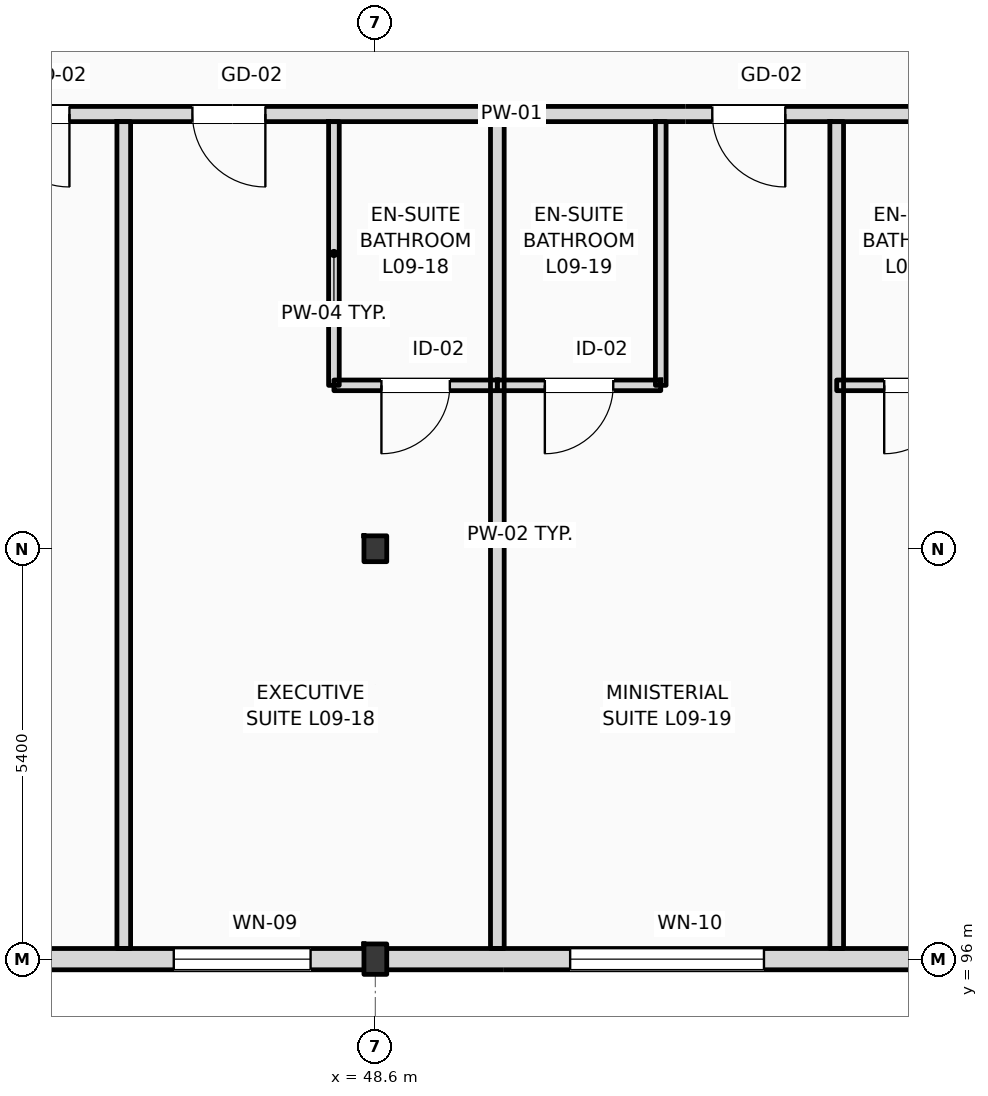
"""IFC4 building model, lengths in metres.
Left out: names, types, materials, properties, quantities, classifications, styles, units other than length and angle.
Written with IfcOpenShell. Run it as: python <this file> out.ifc"""

import sys

from ifc_helpers import new_model, si_unit, direction, frame, frame_2d, origin, origin_2d, place, context, subcontext, project, spatial, rectangle, i_section, extrude, element, fill, save


model = new_model("IFC4")
c1 = context("Model", 3, precision=1e-05, world=origin(), true_north=direction((0.0, 1.0)))
c2 = subcontext(c1, "Body", "Model", "MODEL_VIEW")
j1 = project(units=[si_unit("LENGTHUNIT", "METRE"), si_unit("PLANEANGLEUNIT", "RADIAN")], contexts=[c1])
p1 = place(None, origin())
s1 = spatial("IfcSite", under=j1, at=p1, CompositionType="ELEMENT")
p2 = place(p1, origin())
s2 = spatial("IfcBuilding", under=s1, at=p2, CompositionType="ELEMENT")
p3 = place(p2, frame((0.0, 0.0, 39.0)))
s3 = spatial("IfcBuildingStorey", under=s2, at=p3, CompositionType="ELEMENT", Elevation=39.0)
p4 = place(p3, frame((48.6, 96.0, 0.0), z_axis=(0.0, 0.0, 1.0), x_axis=(1.0, 0.0, 0.0)))
e1 = element("IfcColumn", 1, at=p4, inside=s3, PredefinedType="COLUMN", context=c2, shape_type="SweptSolid", body=[
    extrude(i_section(OverallWidth=0.3, OverallDepth=0.4, WebThickness=0.013, FlangeThickness=0.024, FilletRadius=0.027, at=origin_2d()), origin(), (0.0, 0.0, 1.0), 3.6),
])
p5 = place(p3, frame((48.6, 101.4, 0.0), z_axis=(0.0, 0.0, 1.0), x_axis=(1.0, 0.0, 0.0)))
e2 = element("IfcColumn", 2, at=p5, inside=s3, PredefinedType="COLUMN", context=c2, shape_type="SweptSolid", body=[
    extrude(i_section(OverallWidth=0.3, OverallDepth=0.34, WebThickness=0.012, FlangeThickness=0.021, FilletRadius=0.027, at=origin_2d()), origin(), (0.0, 0.0, 1.0), 3.6),
])
p6 = place(p3, frame((25.2, 96.0, 0.0), z_axis=(0.0, 0.0, 1.0), x_axis=(1.0, 0.0, 0.0)))
e3 = element("IfcWall", 3, at=p6, inside=s3, PredefinedType="STANDARD", context=c2, shape_type="SweptSolid", body=[
    extrude(rectangle(XDim=70.2, YDim=0.28, at=frame_2d((35.1, 0.0))), origin(), (0.0, 0.0, 1.0), 2.92),
])
p7 = place(p6, frame((16.695, 0.0, 0.9)))
e4 = element("IfcOpeningElement", 4, at=p7, cuts=e3, PredefinedType="OPENING", context=c2, shape_type="SweptSolid", body=[
    extrude(rectangle(XDim=2.25, YDim=1.84, at=frame_2d((1.125, 0.92))), frame((0.0, 0.15, 0.0), z_axis=(0.0, -1.0, 0.0), x_axis=(1.0, 0.0, 0.0)), (0.0, 0.0, 1.0), 0.3),
])
p8 = place(p6, frame((20.748, 0.0, 0.9)))
e5 = element("IfcOpeningElement", 5, at=p8, cuts=e3, PredefinedType="OPENING", context=c2, shape_type="SweptSolid", body=[
    extrude(rectangle(XDim=1.8, YDim=1.84, at=frame_2d((0.9, 0.92))), frame((0.0, 0.15, 0.0), z_axis=(0.0, -1.0, 0.0), x_axis=(1.0, 0.0, 0.0)), (0.0, 0.0, 1.0), 0.3),
])
p9 = place(p6, frame((25.963, 0.0, 0.9)))
e6 = element("IfcOpeningElement", 6, at=p9, cuts=e3, PredefinedType="OPENING", context=c2, shape_type="SweptSolid", body=[
    extrude(rectangle(XDim=2.55, YDim=1.84, at=frame_2d((1.275, 0.92))), frame((0.0, 0.15, 0.0), z_axis=(0.0, -1.0, 0.0), x_axis=(1.0, 0.0, 0.0)), (0.0, 0.0, 1.0), 0.3),
])
p10 = place(p6, frame((32.177, 0.0, 0.9)))
e7 = element("IfcOpeningElement", 7, at=p10, cuts=e3, PredefinedType="OPENING", context=c2, shape_type="SweptSolid", body=[
    extrude(rectangle(XDim=1.35, YDim=1.84, at=frame_2d((0.675, 0.92))), frame((0.0, 0.15, 0.0), z_axis=(0.0, -1.0, 0.0), x_axis=(1.0, 0.0, 0.0)), (0.0, 0.0, 1.0), 0.3),
])
p11 = place(p6, frame((35.267, 0.0, 0.9)))
e8 = element("IfcOpeningElement", 8, at=p11, cuts=e3, PredefinedType="OPENING", context=c2, shape_type="SweptSolid", body=[
    extrude(rectangle(XDim=2.85, YDim=1.84, at=frame_2d((1.425, 0.92))), frame((0.0, 0.15, 0.0), z_axis=(0.0, -1.0, 0.0), x_axis=(1.0, 0.0, 0.0)), (0.0, 0.0, 1.0), 0.3),
])
p12 = place(p6, frame((55.56, 0.0, 0.9)))
e9 = element("IfcOpeningElement", 9, at=p12, cuts=e3, PredefinedType="OPENING", context=c2, shape_type="SweptSolid", body=[
    extrude(rectangle(XDim=1.8, YDim=1.84, at=frame_2d((0.9, 0.92))), frame((0.0, 0.15, 0.0), z_axis=(0.0, -1.0, 0.0), x_axis=(1.0, 0.0, 0.0)), (0.0, 0.0, 1.0), 0.3),
])
p13 = place(p6, frame((59.093, 0.0, 0.9)))
e10 = element("IfcOpeningElement", 10, at=p13, cuts=e3, PredefinedType="OPENING", context=c2, shape_type="SweptSolid", body=[
    extrude(rectangle(XDim=2.412, YDim=1.84, at=frame_2d((1.206, 0.92))), frame((0.0, 0.15, 0.0), z_axis=(0.0, -1.0, 0.0), x_axis=(1.0, 0.0, 0.0)), (0.0, 0.0, 1.0), 0.3),
])
p14 = place(p6, frame((63.325, 0.0, 0.9)))
e11 = element("IfcOpeningElement", 11, at=p14, cuts=e3, PredefinedType="OPENING", context=c2, shape_type="SweptSolid", body=[
    extrude(rectangle(XDim=1.8, YDim=1.84, at=frame_2d((0.9, 0.92))), frame((0.0, 0.15, 0.0), z_axis=(0.0, -1.0, 0.0), x_axis=(1.0, 0.0, 0.0)), (0.0, 0.0, 1.0), 0.3),
])
p15 = place(p6, frame((66.718, 0.0, 0.9)))
e12 = element("IfcOpeningElement", 12, at=p15, cuts=e3, PredefinedType="OPENING", context=c2, shape_type="SweptSolid", body=[
    extrude(rectangle(XDim=2.472, YDim=1.84, at=frame_2d((1.236, 0.92))), frame((0.0, 0.15, 0.0), z_axis=(0.0, -1.0, 0.0), x_axis=(1.0, 0.0, 0.0)), (0.0, 0.0, 1.0), 0.3),
])
p16 = place(p3, frame((40.76, 107.12, 0.0), z_axis=(0.0, 0.0, 1.0), x_axis=(1.0, 0.0, 0.0)))
e13 = element("IfcWall", 13, at=p16, inside=s3, PredefinedType="PARTITIONING", context=c2, shape_type="SweptSolid", body=[
    extrude(rectangle(XDim=23.44, YDim=0.2, at=frame_2d((11.72, 0.0))), origin(), (0.0, 0.0, 1.0), 3.38),
])
p17 = place(p16, frame((2.855, 0.0, 0.0)))
e14 = element("IfcOpeningElement", 14, at=p17, cuts=e13, PredefinedType="OPENING", context=c2, shape_type="SweptSolid", body=[
    extrude(rectangle(XDim=0.96, YDim=2.2, at=frame_2d((0.48, 1.1))), frame((0.0, 0.11, 0.0), z_axis=(0.0, -1.0, 0.0), x_axis=(1.0, 0.0, 0.0)), (0.0, 0.0, 1.0), 0.22),
])
p18 = place(p16, frame((5.433, 0.0, 0.0)))
e15 = element("IfcOpeningElement", 15, at=p18, cuts=e13, PredefinedType="OPENING", context=c2, shape_type="SweptSolid", body=[
    extrude(rectangle(XDim=0.96, YDim=2.2, at=frame_2d((0.48, 1.1))), frame((0.0, 0.11, 0.0), z_axis=(0.0, -1.0, 0.0), x_axis=(1.0, 0.0, 0.0)), (0.0, 0.0, 1.0), 0.22),
])
p19 = place(p16, frame((12.273, 0.0, 0.0)))
e16 = element("IfcOpeningElement", 16, at=p19, cuts=e13, PredefinedType="OPENING", context=c2, shape_type="SweptSolid", body=[
    extrude(rectangle(XDim=0.96, YDim=2.2, at=frame_2d((0.48, 1.1))), frame((0.0, 0.11, 0.0), z_axis=(0.0, -1.0, 0.0), x_axis=(1.0, 0.0, 0.0)), (0.0, 0.0, 1.0), 0.22),
])
p20 = place(p16, frame((16.963, 0.0, 0.0)))
e17 = element("IfcOpeningElement", 17, at=p20, cuts=e13, PredefinedType="OPENING", context=c2, shape_type="SweptSolid", body=[
    extrude(rectangle(XDim=0.96, YDim=2.2, at=frame_2d((0.48, 1.1))), frame((0.0, 0.11, 0.0), z_axis=(0.0, -1.0, 0.0), x_axis=(1.0, 0.0, 0.0)), (0.0, 0.0, 1.0), 0.22),
])
p21 = place(p16, frame((19.578, 0.0, 0.0)))
e18 = element("IfcOpeningElement", 18, at=p21, cuts=e13, PredefinedType="OPENING", context=c2, shape_type="SweptSolid", body=[
    extrude(rectangle(XDim=0.96, YDim=2.2, at=frame_2d((0.48, 1.1))), frame((0.0, 0.11, 0.0), z_axis=(0.0, -1.0, 0.0), x_axis=(1.0, 0.0, 0.0)), (0.0, 0.0, 1.0), 0.22),
])
for number, where, z_axis, x_axis in (
    (19, (45.29, 96.14, 0.0), (0.0, 0.0, 1.0), (0.0, 1.0, 0.0)),
    (20, (50.205, 96.14, 0.0), (0.0, 0.0, 1.0), (0.0, 1.0, 0.0)),
):
    element("IfcWall", number, at=place(p3, frame(where, z_axis=z_axis, x_axis=x_axis)), inside=s3, PredefinedType="PARTITIONING", context=c2, shape_type="SweptSolid", body=[
        extrude(rectangle(XDim=10.88, YDim=0.18, at=frame_2d((5.44, 0.0))), origin(), (0.0, 0.0, 1.0), 3.38),
    ])
p22 = place(p3, frame((48.055, 103.55, 0.0), z_axis=(0.0, 0.0, 1.0), x_axis=(0.0, 1.0, 0.0)))
e21 = element("IfcWall", 21, at=p22, inside=s3, PredefinedType="PARTITIONING", context=c2, shape_type="SweptSolid", body=[
    extrude(rectangle(XDim=3.47, YDim=0.14, at=frame_2d((1.735, 0.0))), origin(), (0.0, 0.0, 1.0), 3.38),
])
p23 = place(p3, frame((48.055, 103.55, 0.0), z_axis=(0.0, 0.0, 1.0), x_axis=(1.0, 0.0, 0.0)))
e22 = element("IfcWall", 22, at=p23, inside=s3, PredefinedType="PARTITIONING", context=c2, shape_type="SweptSolid", body=[
    extrude(rectangle(XDim=2.15, YDim=0.14, at=frame_2d((1.075, 0.0))), origin(), (0.0, 0.0, 1.0), 3.38),
])
p24 = place(p23, frame((0.625, 0.0, 0.0)))
e23 = element("IfcOpeningElement", 23, at=p24, cuts=e22, PredefinedType="OPENING", context=c2, shape_type="SweptSolid", body=[
    extrude(rectangle(XDim=0.9, YDim=2.1, at=frame_2d((0.45, 1.05))), frame((0.0, 0.08, 0.0), z_axis=(0.0, -1.0, 0.0), x_axis=(1.0, 0.0, 0.0)), (0.0, 0.0, 1.0), 0.16),
])
p25 = place(p3, frame((54.67, 96.14, 0.0), z_axis=(0.0, 0.0, 1.0), x_axis=(0.0, 1.0, 0.0)))
e24 = element("IfcWall", 24, at=p25, inside=s3, PredefinedType="PARTITIONING", context=c2, shape_type="SweptSolid", body=[
    extrude(rectangle(XDim=10.88, YDim=0.18, at=frame_2d((5.44, 0.0))), origin(), (0.0, 0.0, 1.0), 3.38),
])
p26 = place(p3, frame((52.355, 103.55, 0.0), z_axis=(0.0, 0.0, 1.0), x_axis=(0.0, 1.0, 0.0)))
e25 = element("IfcWall", 25, at=p26, inside=s3, PredefinedType="PARTITIONING", context=c2, shape_type="SweptSolid", body=[
    extrude(rectangle(XDim=3.47, YDim=0.14, at=frame_2d((1.735, 0.0))), origin(), (0.0, 0.0, 1.0), 3.38),
])
p27 = place(p3, frame((50.205, 103.55, 0.0), z_axis=(0.0, 0.0, 1.0), x_axis=(1.0, 0.0, 0.0)))
e26 = element("IfcWall", 26, at=p27, inside=s3, PredefinedType="PARTITIONING", context=c2, shape_type="SweptSolid", body=[
    extrude(rectangle(XDim=2.15, YDim=0.14, at=frame_2d((1.075, 0.0))), origin(), (0.0, 0.0, 1.0), 3.38),
])
p28 = place(p27, frame((0.625, 0.0, 0.0)))
e27 = element("IfcOpeningElement", 27, at=p28, cuts=e26, PredefinedType="OPENING", context=c2, shape_type="SweptSolid", body=[
    extrude(rectangle(XDim=0.9, YDim=2.1, at=frame_2d((0.45, 1.05))), frame((0.0, 0.08, 0.0), z_axis=(0.0, -1.0, 0.0), x_axis=(1.0, 0.0, 0.0)), (0.0, 0.0, 1.0), 0.16),
])
p29 = place(p3, frame((54.67, 103.55, 0.0), z_axis=(0.0, 0.0, 1.0), x_axis=(1.0, 0.0, 0.0)))
e28 = element("IfcWall", 28, at=p29, inside=s3, PredefinedType="PARTITIONING", context=c2, shape_type="SweptSolid", body=[
    extrude(rectangle(XDim=2.15, YDim=0.14, at=frame_2d((1.075, 0.0))), origin(), (0.0, 0.0, 1.0), 3.38),
])
p30 = place(p29, frame((0.625, 0.0, 0.0)))
e29 = element("IfcOpeningElement", 29, at=p30, cuts=e28, PredefinedType="OPENING", context=c2, shape_type="SweptSolid", body=[
    extrude(rectangle(XDim=0.9, YDim=2.1, at=frame_2d((0.45, 1.05))), frame((0.0, 0.08, 0.0), z_axis=(0.0, -1.0, 0.0), x_axis=(1.0, 0.0, 0.0)), (0.0, 0.0, 1.0), 0.16),
])
p31 = place(p8, origin())
e30 = element("IfcWindow", 30, at=p31, inside=s3, PartitioningType="DOUBLE_PANEL_VERTICAL", PredefinedType="WINDOW", context=c2, shape_type="SweptSolid", body=[
    extrude(rectangle(XDim=1.8, YDim=1.84, at=frame_2d((0.9, 0.92))), frame((0.0, 0.03, 0.0), z_axis=(0.0, -1.0, 0.0), x_axis=(1.0, 0.0, 0.0)), (0.0, 0.0, 1.0), 0.06),
])
fill(e5, e30)
p32 = place(p9, origin())
e31 = element("IfcWindow", 31, at=p32, inside=s3, PartitioningType="DOUBLE_PANEL_VERTICAL", PredefinedType="WINDOW", context=c2, shape_type="SweptSolid", body=[
    extrude(rectangle(XDim=2.55, YDim=1.84, at=frame_2d((1.275, 0.92))), frame((0.0, 0.03, 0.0), z_axis=(0.0, -1.0, 0.0), x_axis=(1.0, 0.0, 0.0)), (0.0, 0.0, 1.0), 0.06),
])
fill(e6, e31)
p33 = place(p17, frame((0.96, 0.0, 0.0), z_axis=(0.0, 0.0, 1.0), x_axis=(-1.0, 0.0, 0.0)))
e32 = element("IfcDoor", 32, at=p33, inside=s3, OperationType="SINGLE_SWING_RIGHT", PredefinedType="DOOR", context=c2, shape_type="SweptSolid", body=[
    extrude(rectangle(XDim=0.96, YDim=2.2, at=frame_2d((0.48, 1.1))), frame((0.0, 0.025, 0.0), z_axis=(0.0, -1.0, 0.0), x_axis=(1.0, 0.0, 0.0)), (0.0, 0.0, 1.0), 0.05),
])
fill(e14, e32)
p34 = place(p18, frame((0.96, 0.0, 0.0), z_axis=(0.0, 0.0, 1.0), x_axis=(-1.0, 0.0, 0.0)))
e33 = element("IfcDoor", 33, at=p34, inside=s3, OperationType="SINGLE_SWING_RIGHT", PredefinedType="DOOR", context=c2, shape_type="SweptSolid", body=[
    extrude(rectangle(XDim=0.96, YDim=2.2, at=frame_2d((0.48, 1.1))), frame((0.0, 0.025, 0.0), z_axis=(0.0, -1.0, 0.0), x_axis=(1.0, 0.0, 0.0)), (0.0, 0.0, 1.0), 0.05),
])
fill(e15, e33)
p35 = place(p24, frame((0.9, 0.0, 0.0), z_axis=(0.0, 0.0, 1.0), x_axis=(-1.0, 0.0, 0.0)))
e34 = element("IfcDoor", 34, at=p35, inside=s3, OperationType="SINGLE_SWING_LEFT", PredefinedType="DOOR", context=c2, shape_type="SweptSolid", body=[
    extrude(rectangle(XDim=0.9, YDim=2.1, at=frame_2d((0.45, 1.05))), frame((0.0, 0.025, 0.0), z_axis=(0.0, -1.0, 0.0), x_axis=(1.0, 0.0, 0.0)), (0.0, 0.0, 1.0), 0.05),
])
fill(e23, e34)
p36 = place(p19, frame((0.96, 0.0, 0.0), z_axis=(0.0, 0.0, 1.0), x_axis=(-1.0, 0.0, 0.0)))
e35 = element("IfcDoor", 35, at=p36, inside=s3, OperationType="SINGLE_SWING_RIGHT", PredefinedType="DOOR", context=c2, shape_type="SweptSolid", body=[
    extrude(rectangle(XDim=0.96, YDim=2.2, at=frame_2d((0.48, 1.1))), frame((0.0, 0.025, 0.0), z_axis=(0.0, -1.0, 0.0), x_axis=(1.0, 0.0, 0.0)), (0.0, 0.0, 1.0), 0.05),
])
fill(e16, e35)
p37 = place(p28, frame((0.9, 0.0, 0.0), z_axis=(0.0, 0.0, 1.0), x_axis=(-1.0, 0.0, 0.0)))
e36 = element("IfcDoor", 36, at=p37, inside=s3, OperationType="SINGLE_SWING_LEFT", PredefinedType="DOOR", context=c2, shape_type="SweptSolid", body=[
    extrude(rectangle(XDim=0.9, YDim=2.1, at=frame_2d((0.45, 1.05))), frame((0.0, 0.025, 0.0), z_axis=(0.0, -1.0, 0.0), x_axis=(1.0, 0.0, 0.0)), (0.0, 0.0, 1.0), 0.05),
])
fill(e27, e36)
p38 = place(p30, frame((0.9, 0.0, 0.0), z_axis=(0.0, 0.0, 1.0), x_axis=(-1.0, 0.0, 0.0)))
e37 = element("IfcDoor", 37, at=p38, inside=s3, OperationType="SINGLE_SWING_LEFT", PredefinedType="DOOR", context=c2, shape_type="SweptSolid", body=[
    extrude(rectangle(XDim=0.9, YDim=2.1, at=frame_2d((0.45, 1.05))), frame((0.0, 0.025, 0.0), z_axis=(0.0, -1.0, 0.0), x_axis=(1.0, 0.0, 0.0)), (0.0, 0.0, 1.0), 0.05),
])
fill(e29, e37)
save(model, sys.argv[1])
